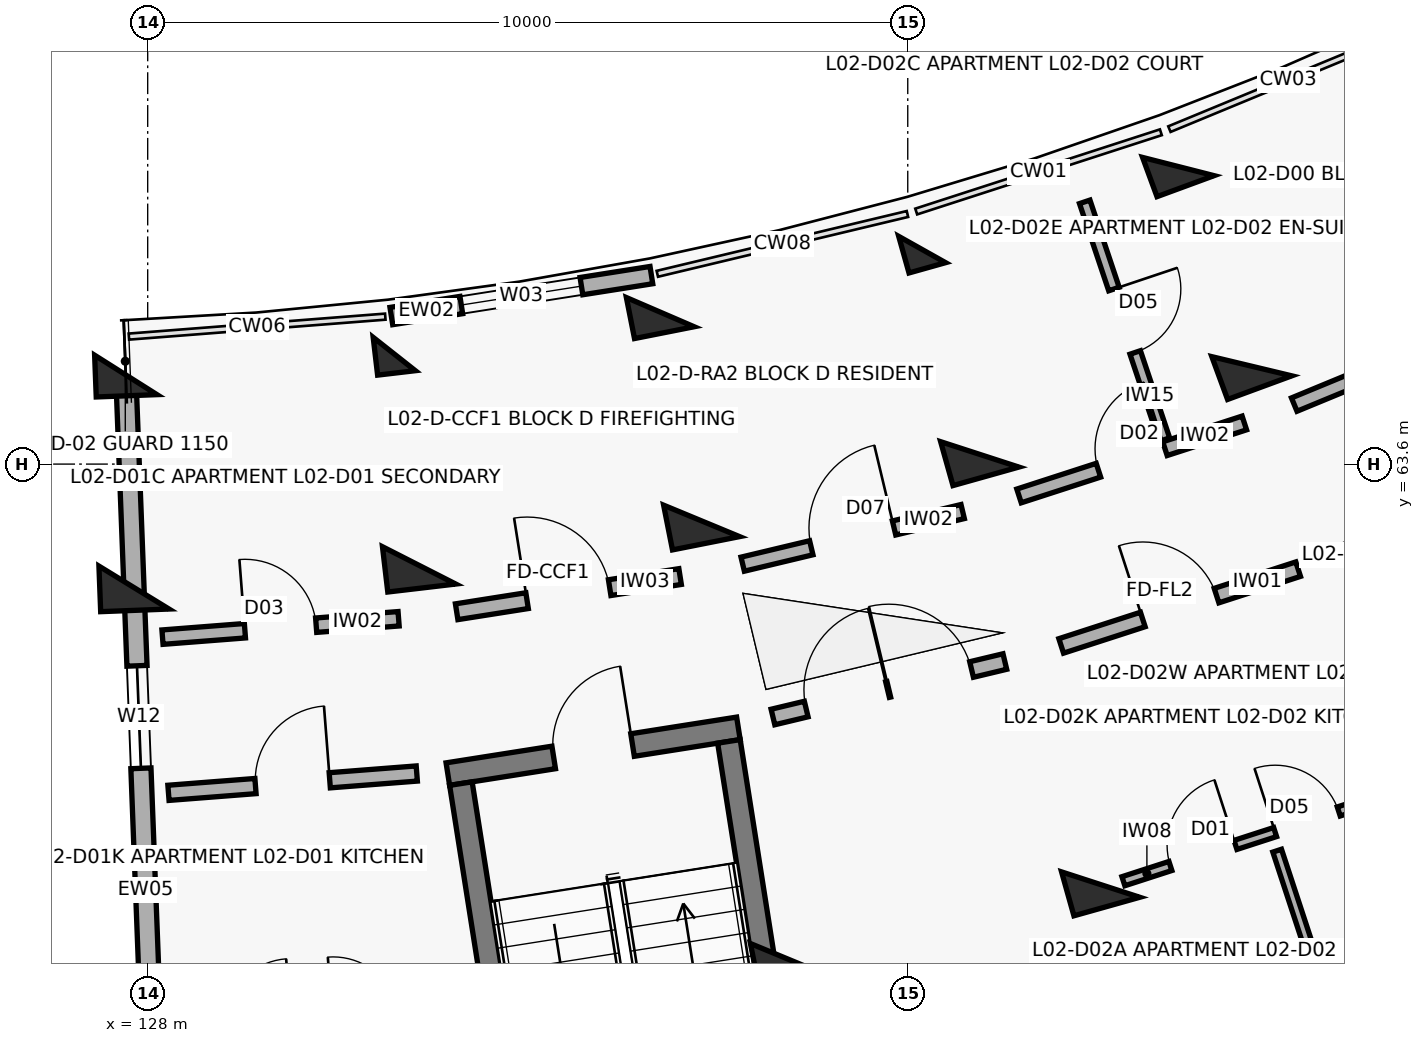
"""IFC4 building model, lengths in metres.
Left out: names, types, materials, properties, quantities, classifications, styles, units other than length and angle.
Written with IfcOpenShell. Run it as: python <this file> out.ifc"""

import sys

from ifc_helpers import new_model, si_unit, direction, frame, frame_2d, origin, origin_2d, place, context, subcontext, project, spatial, rectangle, extrude, element, fill, save


model = new_model("IFC4")
c1 = context("Model", 3, precision=1e-05, world=origin(), true_north=direction((0.0, 1.0)))
c2 = subcontext(c1, "Body", "Model", "MODEL_VIEW")
j1 = project(units=[si_unit("LENGTHUNIT", "METRE"), si_unit("PLANEANGLEUNIT", "RADIAN")], contexts=[c1])
p1 = place(None, origin())
s1 = spatial("IfcSite", under=j1, at=p1, CompositionType="ELEMENT")
p2 = place(p1, origin())
s2 = spatial("IfcBuilding", under=s1, at=p2, CompositionType="ELEMENT")
p3 = place(p2, frame((0.0, 0.0, 8.1)))
s3 = spatial("IfcBuildingStorey", under=s2, at=p3, CompositionType="ELEMENT", Elevation=8.1)
p4 = place(p3, frame((127.712, 64.773, 0.0), z_axis=(0.0, 0.0, 1.0), x_axis=(0.038387809088, -0.999262916411, 0.0)))
e1 = element("IfcColumn", 1, at=p4, inside=s3, PredefinedType="COLUMN", context=c2, shape_type="SweptSolid", body=[
    extrude(rectangle(XDim=0.55, YDim=0.8, at=origin_2d()), origin(), (0.0, 0.0, 1.0), 3.1),
])
p5 = place(p3, frame((127.82, 61.975, 0.0), z_axis=(0.0, 0.0, 1.0), x_axis=(0.038387809088, -0.999262916411, 0.0)))
e2 = element("IfcColumn", 2, at=p5, inside=s3, PredefinedType="COLUMN", context=c2, shape_type="SweptSolid", body=[
    extrude(rectangle(XDim=0.6, YDim=0.9, at=origin_2d()), origin(), (0.0, 0.0, 1.0), 3.1),
])
p6 = place(p3, frame((131.244, 65.048, 0.0), z_axis=(0.0, 0.0, 1.0), x_axis=(0.116670737099, -0.993170649538, 0.0)))
e3 = element("IfcColumn", 3, at=p6, inside=s3, PredefinedType="COLUMN", context=c2, shape_type="SweptSolid", body=[
    extrude(rectangle(XDim=0.5, YDim=0.5, at=origin_2d()), origin(), (0.0, 0.0, 1.0), 3.1),
])
p7 = place(p3, frame((131.571, 62.267, 0.0), z_axis=(0.0, 0.0, 1.0), x_axis=(0.116670737099, -0.993170649538, 0.0)))
e4 = element("IfcColumn", 4, at=p7, inside=s3, PredefinedType="COLUMN", context=c2, shape_type="SweptSolid", body=[
    extrude(rectangle(XDim=0.6, YDim=0.9, at=origin_2d()), origin(), (0.0, 0.0, 1.0), 3.1),
])
p8 = place(p3, frame((134.744, 65.599, 0.0), z_axis=(0.0, 0.0, 1.0), x_axis=(0.19423435122, -0.980955155349, 0.0)))
e5 = element("IfcColumn", 5, at=p8, inside=s3, PredefinedType="COLUMN", context=c2, shape_type="SweptSolid", body=[
    extrude(rectangle(XDim=0.55, YDim=0.8, at=origin_2d()), origin(), (0.0, 0.0, 1.0), 3.1),
])
for number, where, z_axis, x_axis in (
    (6, (135.288, 62.853, 0.0), (0.0, 0.0, 1.0), (0.194, -0.981, 0.0)),
    (7, (136.43, 57.085, 0.0), (0.0, 0.0, 1.0), (0.194, -0.981, 0.0)),
):
    element("IfcColumn", number, at=place(p3, frame(where, z_axis=z_axis, x_axis=x_axis)), inside=s3, PredefinedType="COLUMN", context=c2, shape_type="SweptSolid", body=[
        extrude(rectangle(XDim=0.6, YDim=0.9, at=origin_2d()), origin(), (0.0, 0.0, 1.0), 3.1),
    ])
p9 = place(p3, frame((138.189, 66.423, 0.0), z_axis=(0.0, 0.0, 1.0), x_axis=(0.270600445976, -0.962691746426, 0.0)))
e8 = element("IfcColumn", 8, at=p9, inside=s3, PredefinedType="COLUMN", context=c2, shape_type="SweptSolid", body=[
    extrude(rectangle(XDim=0.5, YDim=0.5, at=origin_2d()), origin(), (0.0, 0.0, 1.0), 3.1),
])
for number, where, z_axis, x_axis in (
    (9, (138.947, 63.728, 0.0), (0.0, 0.0, 1.0), (0.271, -0.963, 0.0)),
    (10, (140.538, 58.067, 0.0), (0.0, 0.0, 1.0), (0.271, -0.963, 0.0)),
):
    element("IfcColumn", number, at=place(p3, frame(where, z_axis=z_axis, x_axis=x_axis)), inside=s3, PredefinedType="COLUMN", context=c2, shape_type="SweptSolid", body=[
        extrude(rectangle(XDim=0.6, YDim=0.9, at=origin_2d()), origin(), (0.0, 0.0, 1.0), 3.1),
    ])
p10 = place(p3, frame((141.56, 67.515, 0.0), z_axis=(0.0, 0.0, 1.0), x_axis=(0.345298198999, -0.93849302276, 0.0)))
e11 = element("IfcColumn", 11, at=p10, inside=s3, PredefinedType="COLUMN", context=c2, shape_type="SweptSolid", body=[
    extrude(rectangle(XDim=0.55, YDim=0.8, at=origin_2d()), origin(), (0.0, 0.0, 1.0), 3.1),
])
p11 = place(p3, frame((142.527, 64.887, 0.0), z_axis=(0.0, 0.0, 1.0), x_axis=(0.345298198999, -0.93849302276, 0.0)))
e12 = element("IfcColumn", 12, at=p11, inside=s3, PredefinedType="COLUMN", context=c2, shape_type="SweptSolid", body=[
    extrude(rectangle(XDim=0.6, YDim=0.9, at=origin_2d()), origin(), (0.0, 0.0, 1.0), 3.1),
])
p12 = place(p3, frame((131.206, 65.548, 0.0), z_axis=(0.0, 0.0, 1.0), x_axis=(0.987825183084, 0.155568016203, 0.0)))
e13 = element("IfcWall", 13, at=p12, inside=s3, PredefinedType="SOLIDWALL", context=c2, shape_type="SweptSolid", body=[
    extrude(rectangle(XDim=3.464, YDim=0.23, at=frame_2d((1.732, 0.0))), origin(), (0.0, 0.0, 1.0), 2.25),
])
p13 = place(p12, frame((0.932, 0.0, 0.32)))
e14 = element("IfcOpeningElement", 14, at=p13, cuts=e13, PredefinedType="OPENING", context=c2, shape_type="SweptSolid", body=[
    extrude(rectangle(XDim=1.6, YDim=1.5, at=frame_2d((0.8, 0.75))), frame((0.0, 0.125, 0.0), z_axis=(0.0, -1.0, 0.0), x_axis=(1.0, 0.0, 0.0)), (0.0, 0.0, 1.0), 0.25),
])
p14 = place(p3, frame((127.721, 64.533, 0.0), z_axis=(0.0, 0.0, 1.0), x_axis=(0.038407966241, -0.999262141847, 0.0)))
e15 = element("IfcWall", 15, at=p14, inside=s3, PredefinedType="SOLIDWALL", context=c2, shape_type="SweptSolid", body=[
    extrude(rectangle(XDim=8.2, YDim=0.265, at=frame_2d((4.1, 0.0))), origin(), (0.0, 0.0, 1.0), 2.08),
])
p15 = place(p14, frame((3.59, 0.0, 0.75)))
e16 = element("IfcOpeningElement", 16, at=p15, cuts=e15, PredefinedType="OPENING", context=c2, shape_type="SweptSolid", body=[
    extrude(rectangle(XDim=1.35, YDim=1.35, at=frame_2d((0.675, 0.675))), frame((0.0, 0.142, 0.0), z_axis=(0.0, -1.0, 0.0), x_axis=(1.0, 0.0, 0.0)), (0.0, 0.0, 1.0), 0.285),
])
p16 = place(p3, frame((131.949, 59.521, 0.0), z_axis=(0.0, 0.0, 1.0), x_axis=(0.98782579805, 0.155564111245, 0.0)))
e17 = element("IfcWall", 17, at=p16, inside=s3, PredefinedType="SHEAR", context=c2, shape_type="SweptSolid", body=[
    extrude(rectangle(XDim=3.87, YDim=0.3, at=frame_2d((1.935, 0.0))), origin(), (0.0, 0.0, 1.0), 3.1),
])
p17 = place(p16, frame((1.41, 0.0, 0.0)))
e18 = element("IfcOpeningElement", 18, at=p17, cuts=e17, PredefinedType="OPENING", context=c2, shape_type="SweptSolid", body=[
    extrude(rectangle(XDim=1.05, YDim=2.15, at=frame_2d((0.525, 1.075))), frame((0.0, 0.16, 0.0), z_axis=(0.0, -1.0, 0.0), x_axis=(1.0, 0.0, 0.0)), (0.0, 0.0, 1.0), 0.32),
])
p18 = place(p3, frame((132.121, 59.396, 0.0), z_axis=(0.0, 0.0, 1.0), x_axis=(0.155563141844, -0.987825950712, 0.0)))
e19 = element("IfcWall", 19, at=p18, inside=s3, PredefinedType="SHEAR", context=c2, shape_type="SweptSolid", body=[
    extrude(rectangle(XDim=7.69, YDim=0.3, at=frame_2d((3.845, 0.0))), origin(), (0.0, 0.0, 1.0), 3.1),
])
p19 = place(p3, frame((135.647, 59.951, 0.0), z_axis=(0.0, 0.0, 1.0), x_axis=(0.155568020624, -0.987825182388, 0.0)))
e20 = element("IfcWall", 20, at=p19, inside=s3, PredefinedType="SHEAR", context=c2, shape_type="SweptSolid", body=[
    extrude(rectangle(XDim=7.69, YDim=0.3, at=frame_2d((3.845, 0.0))), origin(), (0.0, 0.0, 1.0), 3.1),
])
p20 = place(p3, frame((128.273, 59.274, 0.0), z_axis=(0.0, 0.0, 1.0), x_axis=(0.996982624396, 0.077625038827, 0.0)))
e21 = element("IfcWall", 21, at=p20, inside=s3, PredefinedType="SOLIDWALL", context=c2, shape_type="SweptSolid", body=[
    extrude(rectangle(XDim=3.277, YDim=0.2, at=frame_2d((1.639, 0.0))), origin(), (0.0, 0.0, 1.0), 2.08),
])
p21 = place(p20, frame((1.148, 0.0, 0.0)))
e22 = element("IfcOpeningElement", 22, at=p21, cuts=e21, PredefinedType="OPENING", context=c2, shape_type="SweptSolid", body=[
    extrude(rectangle(XDim=0.98, YDim=2.15, at=frame_2d((0.49, 1.075))), frame((0.0, 0.11, 0.0), z_axis=(0.0, -1.0, 0.0), x_axis=(1.0, 0.0, 0.0)), (0.0, 0.0, 1.0), 0.22),
])
p22 = place(p3, frame((128.195, 61.323, 0.0), z_axis=(0.0, 0.0, 1.0), x_axis=(0.996987280187, 0.077565218655, 0.0)))
e23 = element("IfcWall", 23, at=p22, inside=s3, PredefinedType="SOLIDWALL", context=c2, shape_type="SweptSolid", body=[
    extrude(rectangle(XDim=3.116, YDim=0.19, at=frame_2d((1.558, 0.0))), origin(), (0.0, 0.0, 1.0), 2.08),
])
p23 = place(p22, frame((1.088, 0.0, 0.0)))
e24 = element("IfcOpeningElement", 24, at=p23, cuts=e23, PredefinedType="OPENING", context=c2, shape_type="SweptSolid", body=[
    extrude(rectangle(XDim=0.94, YDim=2.1, at=frame_2d((0.47, 1.05))), frame((0.0, 0.105, 0.0), z_axis=(0.0, -1.0, 0.0), x_axis=(1.0, 0.0, 0.0)), (0.0, 0.0, 1.0), 0.21),
])
p24 = place(p3, frame((132.065, 61.657, 0.0), z_axis=(0.0, 0.0, 1.0), x_axis=(0.987816121487, 0.155625544594, 0.0)))
e25 = element("IfcWall", 25, at=p24, inside=s3, PredefinedType="SOLIDWALL", context=c2, shape_type="SweptSolid", body=[
    extrude(rectangle(XDim=2.976, YDim=0.21, at=frame_2d((1.488, 0.0))), origin(), (0.0, 0.0, 1.0), 2.08),
])
p25 = place(p24, frame((0.938, 0.0, 0.0)))
e26 = element("IfcOpeningElement", 26, at=p25, cuts=e25, PredefinedType="OPENING", context=c2, shape_type="SweptSolid", body=[
    extrude(rectangle(XDim=1.1, YDim=2.15, at=frame_2d((0.55, 1.075))), frame((0.0, 0.115, 0.0), z_axis=(0.0, -1.0, 0.0), x_axis=(1.0, 0.0, 0.0)), (0.0, 0.0, 1.0), 0.23),
])
p26 = place(p3, frame((136.227, 60.272, 0.0), z_axis=(0.0, 0.0, 1.0), x_axis=(0.972564346632, 0.232634029456, 0.0)))
e27 = element("IfcWall", 27, at=p26, inside=s3, PredefinedType="SOLIDWALL", context=c2, shape_type="SweptSolid", body=[
    extrude(rectangle(XDim=3.137, YDim=0.21, at=frame_2d((1.568, 0.0))), origin(), (0.0, 0.0, 1.0), 2.08),
])
p27 = place(p26, frame((0.45, 0.0, 0.0)))
e28 = element("IfcOpeningElement", 28, at=p27, cuts=e27, PredefinedType="OPENING", context=c2, shape_type="SweptSolid", body=[
    extrude(rectangle(XDim=1.1, YDim=2.15, at=frame_2d((0.55, 1.075))), frame((0.0, 0.115, 0.0), z_axis=(0.0, -1.0, 0.0), x_axis=(1.0, 0.0, 0.0)), (0.0, 0.0, 1.0), 0.23),
])
p28 = place(p26, frame((1.567, 0.0, 0.0)))
e29 = element("IfcOpeningElement", 29, at=p28, cuts=e27, PredefinedType="OPENING", context=c2, shape_type="SweptSolid", body=[
    extrude(rectangle(XDim=1.12, YDim=2.15, at=frame_2d((0.56, 1.075))), frame((0.0, 0.115, 0.0), z_axis=(0.0, -1.0, 0.0), x_axis=(1.0, 0.0, 0.0)), (0.0, 0.0, 1.0), 0.23),
])
p29 = place(p3, frame((135.828, 62.283, 0.0), z_axis=(0.0, 0.0, 1.0), x_axis=(0.972558314217, 0.232659247501, 0.0)))
e30 = element("IfcWall", 30, at=p29, inside=s3, PredefinedType="SOLIDWALL", context=c2, shape_type="SweptSolid", body=[
    extrude(rectangle(XDim=2.976, YDim=0.19, at=frame_2d((1.488, 0.0))), origin(), (0.0, 0.0, 1.0), 2.08),
])
p30 = place(p29, frame((0.928, 0.0, 0.0)))
e31 = element("IfcOpeningElement", 31, at=p30, cuts=e30, PredefinedType="OPENING", context=c2, shape_type="SweptSolid", body=[
    extrude(rectangle(XDim=1.12, YDim=2.15, at=frame_2d((0.56, 1.075))), frame((0.0, 0.105, 0.0), z_axis=(0.0, -1.0, 0.0), x_axis=(1.0, 0.0, 0.0)), (0.0, 0.0, 1.0), 0.21),
])
p31 = place(p3, frame((140.019, 61.208, 0.0), z_axis=(0.0, 0.0, 1.0), x_axis=(0.951323803878, 0.308193154005, 0.0)))
e32 = element("IfcWall", 32, at=p31, inside=s3, PredefinedType="SOLIDWALL", context=c2, shape_type="SweptSolid", body=[
    extrude(rectangle(XDim=3.277, YDim=0.2, at=frame_2d((1.639, 0.0))), origin(), (0.0, 0.0, 1.0), 2.08),
])
p32 = place(p31, frame((1.128, 0.0, 0.0)))
e33 = element("IfcOpeningElement", 33, at=p32, cuts=e32, PredefinedType="OPENING", context=c2, shape_type="SweptSolid", body=[
    extrude(rectangle(XDim=1.02, YDim=2.15, at=frame_2d((0.51, 1.075))), frame((0.0, 0.11, 0.0), z_axis=(0.0, -1.0, 0.0), x_axis=(1.0, 0.0, 0.0)), (0.0, 0.0, 1.0), 0.22),
])
p33 = place(p3, frame((139.464, 63.181, 0.0), z_axis=(0.0, 0.0, 1.0), x_axis=(0.951336474448, 0.308154040027, 0.0)))
e34 = element("IfcWall", 34, at=p33, inside=s3, PredefinedType="SOLIDWALL", context=c2, shape_type="SweptSolid", body=[
    extrude(rectangle(XDim=3.116, YDim=0.19, at=frame_2d((1.558, 0.0))), origin(), (0.0, 0.0, 1.0), 2.08),
])
p34 = place(p33, frame((1.098, 0.0, 0.0)))
e35 = element("IfcOpeningElement", 35, at=p34, cuts=e34, PredefinedType="OPENING", context=c2, shape_type="SweptSolid", body=[
    extrude(rectangle(XDim=0.92, YDim=2.1, at=frame_2d((0.46, 1.05))), frame((0.0, 0.105, 0.0), z_axis=(0.0, -1.0, 0.0), x_axis=(1.0, 0.0, 0.0)), (0.0, 0.0, 1.0), 0.21),
])
p35 = place(p3, frame((140.328, 67.051, 0.0), z_axis=(0.0, 0.0, 1.0), x_axis=(0.317825321803, -0.948149284038, 0.0)))
e36 = element("IfcWall", 36, at=p35, inside=s3, PredefinedType="PARTITIONING", context=c2, shape_type="SweptSolid", body=[
    extrude(rectangle(XDim=3.3, YDim=0.145, at=frame_2d((1.65, 0.0))), origin(), (0.0, 0.0, 1.0), 2.08),
])
p36 = place(p35, frame((1.21, 0.0, 0.0)))
e37 = element("IfcOpeningElement", 37, at=p36, cuts=e36, PredefinedType="OPENING", context=c2, shape_type="SweptSolid", body=[
    extrude(rectangle(XDim=0.88, YDim=2.1, at=frame_2d((0.44, 1.05))), frame((0.0, 0.083, 0.0), z_axis=(0.0, -1.0, 0.0), x_axis=(1.0, 0.0, 0.0)), (0.0, 0.0, 1.0), 0.165),
])
p37 = place(p3, frame((140.837, 58.112, 0.0), z_axis=(0.0, 0.0, 1.0), x_axis=(0.951327366371, 0.308182157164, 0.0)))
e38 = element("IfcWall", 38, at=p37, inside=s3, PredefinedType="PARTITIONING", context=c2, shape_type="SweptSolid", body=[
    extrude(rectangle(XDim=3.628, YDim=0.125, at=frame_2d((1.814, 0.0))), origin(), (0.0, 0.0, 1.0), 2.08),
])
p38 = place(p37, frame((0.65, 0.0, 0.0)))
e39 = element("IfcOpeningElement", 39, at=p38, cuts=e38, PredefinedType="OPENING", context=c2, shape_type="SweptSolid", body=[
    extrude(rectangle(XDim=0.9, YDim=2.1, at=frame_2d((0.45, 1.05))), frame((0.0, 0.073, 0.0), z_axis=(0.0, -1.0, 0.0), x_axis=(1.0, 0.0, 0.0)), (0.0, 0.0, 1.0), 0.145),
])
p39 = place(p37, frame((2.098, 0.0, 0.0)))
e40 = element("IfcOpeningElement", 40, at=p39, cuts=e38, PredefinedType="OPENING", context=c2, shape_type="SweptSolid", body=[
    extrude(rectangle(XDim=0.88, YDim=2.1, at=frame_2d((0.44, 1.05))), frame((0.0, 0.073, 0.0), z_axis=(0.0, -1.0, 0.0), x_axis=(1.0, 0.0, 0.0)), (0.0, 0.0, 1.0), 0.145),
])
p40 = place(p3, frame((142.86, 58.513, 0.0), z_axis=(0.0, 0.0, 1.0), x_axis=(0.312308755556, -0.949980653068, 0.0)))
e41 = element("IfcWall", 41, at=p40, inside=s3, PredefinedType="PARTITIONING", context=c2, shape_type="SweptSolid", body=[
    extrude(rectangle(XDim=4.9, YDim=0.12, at=frame_2d((2.45, 0.0))), origin(), (0.0, 0.0, 1.0), 2.08),
])
p41 = place(p40, frame((2.0, 0.0, 0.0)))
e42 = element("IfcOpeningElement", 42, at=p41, cuts=e41, PredefinedType="OPENING", context=c2, shape_type="SweptSolid", body=[
    extrude(rectangle(XDim=0.9, YDim=2.1, at=frame_2d((0.45, 1.05))), frame((0.0, 0.07, 0.0), z_axis=(0.0, -1.0, 0.0), x_axis=(1.0, 0.0, 0.0)), (0.0, 0.0, 1.0), 0.14),
])
p42 = place(p3, frame((143.085, 64.383, 0.0), z_axis=(0.0, 0.0, 1.0), x_axis=(0.924213340202, 0.381876553081, 0.0)))
e43 = element("IfcWall", 43, at=p42, inside=s3, PredefinedType="SOLIDWALL", context=c2, shape_type="SweptSolid", body=[
    extrude(rectangle(XDim=3.116, YDim=0.19, at=frame_2d((1.558, 0.0))), origin(), (0.0, 0.0, 1.0), 2.08),
])
p43 = place(p42, frame((1.088, 0.0, 0.0)))
e44 = element("IfcOpeningElement", 44, at=p43, cuts=e43, PredefinedType="OPENING", context=c2, shape_type="SweptSolid", body=[
    extrude(rectangle(XDim=0.94, YDim=2.1, at=frame_2d((0.47, 1.05))), frame((0.0, 0.105, 0.0), z_axis=(0.0, -1.0, 0.0), x_axis=(1.0, 0.0, 0.0)), (0.0, 0.0, 1.0), 0.21),
])
p44 = place(p13, origin())
e45 = element("IfcWindow", 45, at=p44, inside=s3, PartitioningType="DOUBLE_PANEL_VERTICAL", PredefinedType="WINDOW", context=c2, shape_type="SweptSolid", body=[
    extrude(rectangle(XDim=1.6, YDim=1.5, at=frame_2d((0.8, 0.75))), frame((0.0, 0.03, 0.0), z_axis=(0.0, -1.0, 0.0), x_axis=(1.0, 0.0, 0.0)), (0.0, 0.0, 1.0), 0.06),
])
fill(e14, e45)
p45 = place(p15, origin())
e46 = element("IfcWindow", 46, at=p45, inside=s3, PartitioningType="DOUBLE_PANEL_VERTICAL", PredefinedType="WINDOW", context=c2, shape_type="SweptSolid", body=[
    extrude(rectangle(XDim=1.35, YDim=1.35, at=frame_2d((0.675, 0.675))), frame((0.0, 0.03, 0.0), z_axis=(0.0, -1.0, 0.0), x_axis=(1.0, 0.0, 0.0)), (0.0, 0.0, 1.0), 0.06),
])
fill(e16, e46)
p46 = place(p17, origin())
e47 = element("IfcDoor", 47, at=p46, inside=s3, OperationType="SINGLE_SWING_RIGHT", PredefinedType="DOOR", context=c2, shape_type="SweptSolid", body=[
    extrude(rectangle(XDim=1.05, YDim=2.15, at=frame_2d((0.525, 1.075))), frame((0.0, 0.025, 0.0), z_axis=(0.0, -1.0, 0.0), x_axis=(1.0, 0.0, 0.0)), (0.0, 0.0, 1.0), 0.05),
])
fill(e18, e47)
p47 = place(p21, origin())
e48 = element("IfcDoor", 48, at=p47, inside=s3, OperationType="SINGLE_SWING_RIGHT", PredefinedType="DOOR", context=c2, shape_type="SweptSolid", body=[
    extrude(rectangle(XDim=0.98, YDim=2.15, at=frame_2d((0.49, 1.075))), frame((0.0, 0.025, 0.0), z_axis=(0.0, -1.0, 0.0), x_axis=(1.0, 0.0, 0.0)), (0.0, 0.0, 1.0), 0.05),
])
fill(e22, e48)
p48 = place(p23, origin())
e49 = element("IfcDoor", 49, at=p48, inside=s3, OperationType="SINGLE_SWING_LEFT", PredefinedType="DOOR", context=c2, shape_type="SweptSolid", body=[
    extrude(rectangle(XDim=0.94, YDim=2.1, at=frame_2d((0.47, 1.05))), frame((0.0, 0.025, 0.0), z_axis=(0.0, -1.0, 0.0), x_axis=(1.0, 0.0, 0.0)), (0.0, 0.0, 1.0), 0.05),
])
fill(e24, e49)
p49 = place(p25, origin())
e50 = element("IfcDoor", 50, at=p49, inside=s3, OperationType="SINGLE_SWING_LEFT", PredefinedType="DOOR", context=c2, shape_type="SweptSolid", body=[
    extrude(rectangle(XDim=1.1, YDim=2.15, at=frame_2d((0.55, 1.075))), frame((0.0, 0.025, 0.0), z_axis=(0.0, -1.0, 0.0), x_axis=(1.0, 0.0, 0.0)), (0.0, 0.0, 1.0), 0.05),
])
fill(e26, e50)
p50 = place(p27, origin())
e51 = element("IfcDoor", 51, at=p50, inside=s3, OperationType="SINGLE_SWING_RIGHT", PredefinedType="DOOR", context=c2, shape_type="SweptSolid", body=[
    extrude(rectangle(XDim=1.1, YDim=2.15, at=frame_2d((0.55, 1.075))), frame((0.0, 0.025, 0.0), z_axis=(0.0, -1.0, 0.0), x_axis=(1.0, 0.0, 0.0)), (0.0, 0.0, 1.0), 0.05),
])
fill(e28, e51)
p51 = place(p28, origin())
e52 = element("IfcDoor", 52, at=p51, inside=s3, OperationType="SINGLE_SWING_LEFT", PredefinedType="DOOR", context=c2, shape_type="SweptSolid", body=[
    extrude(rectangle(XDim=1.12, YDim=2.15, at=frame_2d((0.56, 1.075))), frame((0.0, 0.025, 0.0), z_axis=(0.0, -1.0, 0.0), x_axis=(1.0, 0.0, 0.0)), (0.0, 0.0, 1.0), 0.05),
])
fill(e29, e52)
p52 = place(p30, origin())
e53 = element("IfcDoor", 53, at=p52, inside=s3, OperationType="SINGLE_SWING_RIGHT", PredefinedType="DOOR", context=c2, shape_type="SweptSolid", body=[
    extrude(rectangle(XDim=1.12, YDim=2.15, at=frame_2d((0.56, 1.075))), frame((0.0, 0.025, 0.0), z_axis=(0.0, -1.0, 0.0), x_axis=(1.0, 0.0, 0.0)), (0.0, 0.0, 1.0), 0.05),
])
fill(e31, e53)
p53 = place(p32, origin())
e54 = element("IfcDoor", 54, at=p53, inside=s3, OperationType="SINGLE_SWING_LEFT", PredefinedType="DOOR", context=c2, shape_type="SweptSolid", body=[
    extrude(rectangle(XDim=1.02, YDim=2.15, at=frame_2d((0.51, 1.075))), frame((0.0, 0.025, 0.0), z_axis=(0.0, -1.0, 0.0), x_axis=(1.0, 0.0, 0.0)), (0.0, 0.0, 1.0), 0.05),
])
fill(e33, e54)
p54 = place(p34, origin())
e55 = element("IfcDoor", 55, at=p54, inside=s3, OperationType="SINGLE_SWING_RIGHT", PredefinedType="DOOR", context=c2, shape_type="SweptSolid", body=[
    extrude(rectangle(XDim=0.92, YDim=2.1, at=frame_2d((0.46, 1.05))), frame((0.0, 0.025, 0.0), z_axis=(0.0, -1.0, 0.0), x_axis=(1.0, 0.0, 0.0)), (0.0, 0.0, 1.0), 0.05),
])
fill(e35, e55)
p55 = place(p36, origin())
e56 = element("IfcDoor", 56, at=p55, inside=s3, OperationType="SINGLE_SWING_LEFT", PredefinedType="DOOR", context=c2, shape_type="SweptSolid", body=[
    extrude(rectangle(XDim=0.88, YDim=2.1, at=frame_2d((0.44, 1.05))), frame((0.0, 0.025, 0.0), z_axis=(0.0, -1.0, 0.0), x_axis=(1.0, 0.0, 0.0)), (0.0, 0.0, 1.0), 0.05),
])
fill(e37, e56)
p56 = place(p38, origin())
e57 = element("IfcDoor", 57, at=p56, inside=s3, OperationType="SINGLE_SWING_RIGHT", PredefinedType="DOOR", context=c2, shape_type="SweptSolid", body=[
    extrude(rectangle(XDim=0.9, YDim=2.1, at=frame_2d((0.45, 1.05))), frame((0.0, 0.025, 0.0), z_axis=(0.0, -1.0, 0.0), x_axis=(1.0, 0.0, 0.0)), (0.0, 0.0, 1.0), 0.05),
])
fill(e39, e57)
p57 = place(p39, origin())
e58 = element("IfcDoor", 58, at=p57, inside=s3, OperationType="SINGLE_SWING_LEFT", PredefinedType="DOOR", context=c2, shape_type="SweptSolid", body=[
    extrude(rectangle(XDim=0.88, YDim=2.1, at=frame_2d((0.44, 1.05))), frame((0.0, 0.025, 0.0), z_axis=(0.0, -1.0, 0.0), x_axis=(1.0, 0.0, 0.0)), (0.0, 0.0, 1.0), 0.05),
])
fill(e40, e58)
save(model, sys.argv[1])
